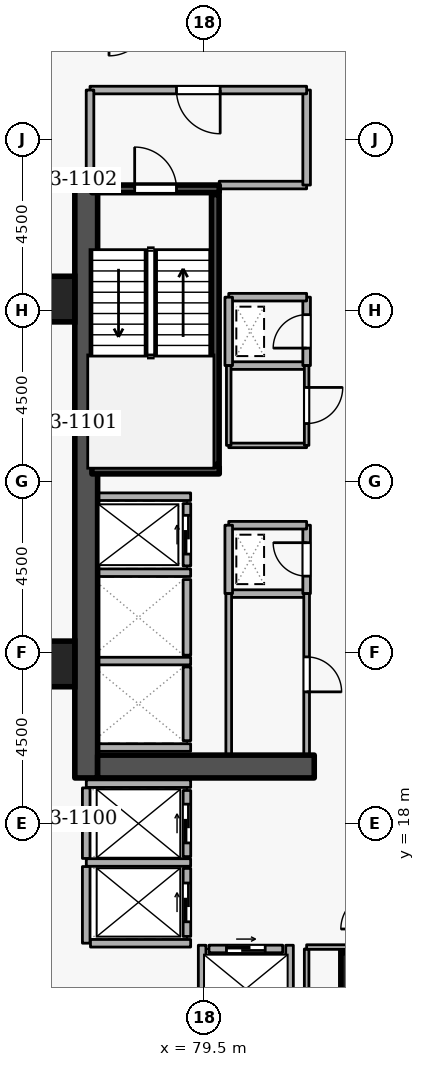
"""IFC4 building model, lengths in metres.
Left out: names, types, materials, properties, quantities, classifications, styles, units other than length and angle.
Written with IfcOpenShell. Run it as: python <this file> out.ifc"""

import sys

from ifc_helpers import new_model, si_unit, direction, frame, frame_2d, origin, origin_2d, place, context, subcontext, project, spatial, rectangle, extrude, element, fill, save


model = new_model("IFC4")
c1 = context("Model", 3, precision=1e-05, world=origin(), true_north=direction((0.0, 1.0)))
c2 = subcontext(c1, "Body", "Model", "MODEL_VIEW")
j1 = project(units=[si_unit("LENGTHUNIT", "METRE"), si_unit("PLANEANGLEUNIT", "RADIAN")], contexts=[c1])
p1 = place(None, origin())
s1 = spatial("IfcSite", under=j1, at=p1, CompositionType="ELEMENT")
p2 = place(p1, origin())
s2 = spatial("IfcBuilding", under=s1, at=p2, CompositionType="ELEMENT")
p3 = place(p2, frame((0.0, 0.0, 90.9)))
s3 = spatial("IfcBuildingStorey", under=s2, at=p3, CompositionType="ELEMENT", Elevation=90.9)
p4 = place(p3, frame((76.4, 19.2, 0.0), z_axis=(0.0, 0.0, 1.0), x_axis=(0.0, 1.0, 0.0)))
e1 = element("IfcWall", 1, at=p4, inside=s3, PredefinedType="SHEAR", context=c2, shape_type="SweptSolid", body=[
    extrude(rectangle(XDim=15.6, YDim=0.6, at=frame_2d((7.8, 0.0))), origin(), (0.0, 0.0, 1.0), 3.6),
])
p5 = place(p3, frame((76.7, 19.5, 0.0), z_axis=(0.0, 0.0, 1.0), x_axis=(1.0, 0.0, 0.0)))
e2 = element("IfcWall", 2, at=p5, inside=s3, PredefinedType="SHEAR", context=c2, shape_type="SweptSolid", body=[
    extrude(rectangle(XDim=5.7, YDim=0.6, at=frame_2d((2.85, 0.0))), origin(), (0.0, 0.0, 1.0), 3.6),
])
for number, where, z_axis, x_axis in (
    (3, (83.7, 14.0, 0.0), (0.0, 0.0, 1.0), (1.0, 0.0, 0.0)),
    (4, (75.5, 22.2, 0.0), (0.0, 0.0, 1.0), (1.0, 0.0, 0.0)),
    (5, (75.5, 31.8, 0.0), (0.0, 0.0, 1.0), (1.0, 0.0, 0.0)),
):
    element("IfcColumn", number, at=place(p3, frame(where, z_axis=z_axis, x_axis=x_axis)), inside=s3, PredefinedType="COLUMN", context=c2, shape_type="SweptSolid", body=[
        extrude(rectangle(XDim=1.2, YDim=1.2, at=origin_2d()), origin(), (0.0, 0.0, 1.0), 3.6),
    ])
p6 = place(p3, frame((79.05, 24.78, 0.0), z_axis=(0.0, 0.0, 1.0), x_axis=(0.0, 1.0, 0.0)))
e6 = element("IfcWall", 6, at=p6, inside=s3, PredefinedType="STANDARD", context=c2, shape_type="SweptSolid", body=[
    extrude(rectangle(XDim=1.64, YDim=0.2, at=frame_2d((0.82, 0.0))), origin(), (0.0, 0.0, 1.0), 3.34),
])
p7 = place(p6, frame((0.31, 0.0, 0.0)))
e7 = element("IfcOpeningElement", 7, at=p7, cuts=e6, PredefinedType="OPENING", context=c2, shape_type="SweptSolid", body=[
    extrude(rectangle(XDim=1.02, YDim=2.06, at=frame_2d((0.51, 1.03))), frame((0.0, 0.11, 0.0), z_axis=(0.0, -1.0, 0.0), x_axis=(1.0, 0.0, 0.0)), (0.0, 0.0, 1.0), 0.22),
])
p8 = place(p3, frame((79.05, 22.43, 0.0), z_axis=(0.0, 0.0, 1.0), x_axis=(0.0, 1.0, 0.0)))
e8 = element("IfcWall", 8, at=p8, inside=s3, PredefinedType="STANDARD", context=c2, shape_type="SweptSolid", body=[
    extrude(rectangle(XDim=1.99, YDim=0.2, at=frame_2d((0.995, 0.0))), origin(), (0.0, 0.0, 1.0), 3.34),
])
p9 = place(p3, frame((79.05, 20.18, 0.0), z_axis=(0.0, 0.0, 1.0), x_axis=(0.0, 1.0, 0.0)))
e9 = element("IfcWall", 9, at=p9, inside=s3, PredefinedType="STANDARD", context=c2, shape_type="SweptSolid", body=[
    extrude(rectangle(XDim=1.94, YDim=0.2, at=frame_2d((0.97, 0.0))), origin(), (0.0, 0.0, 1.0), 3.34),
])
p10 = place(p3, frame((79.05, 17.13, 0.0), z_axis=(0.0, 0.0, 1.0), x_axis=(0.0, 1.0, 0.0)))
e10 = element("IfcWall", 10, at=p10, inside=s3, PredefinedType="STANDARD", context=c2, shape_type="SweptSolid", body=[
    extrude(rectangle(XDim=1.74, YDim=0.2, at=frame_2d((0.87, 0.0))), origin(), (0.0, 0.0, 1.0), 3.34),
])
p11 = place(p10, frame((0.36, 0.0, 0.0)))
e11 = element("IfcOpeningElement", 11, at=p11, cuts=e10, PredefinedType="OPENING", context=c2, shape_type="SweptSolid", body=[
    extrude(rectangle(XDim=1.02, YDim=2.06, at=frame_2d((0.51, 1.03))), frame((0.0, 0.11, 0.0), z_axis=(0.0, -1.0, 0.0), x_axis=(1.0, 0.0, 0.0)), (0.0, 0.0, 1.0), 0.22),
])
p12 = place(p3, frame((79.05, 15.03, 0.0), z_axis=(0.0, 0.0, 1.0), x_axis=(0.0, 1.0, 0.0)))
e12 = element("IfcWall", 12, at=p12, inside=s3, PredefinedType="STANDARD", context=c2, shape_type="SweptSolid", body=[
    extrude(rectangle(XDim=1.79, YDim=0.2, at=frame_2d((0.895, 0.0))), origin(), (0.0, 0.0, 1.0), 3.34),
])
p13 = place(p12, frame((0.385, 0.0, 0.0)))
e13 = element("IfcOpeningElement", 13, at=p13, cuts=e12, PredefinedType="OPENING", context=c2, shape_type="SweptSolid", body=[
    extrude(rectangle(XDim=1.02, YDim=2.06, at=frame_2d((0.51, 1.03))), frame((0.0, 0.11, 0.0), z_axis=(0.0, -1.0, 0.0), x_axis=(1.0, 0.0, 0.0)), (0.0, 0.0, 1.0), 0.22),
])
p14 = place(p3, frame((79.63, 14.7, 0.0), z_axis=(0.0, 0.0, 1.0), x_axis=(1.0, 0.0, 0.0)))
e14 = element("IfcWall", 14, at=p14, inside=s3, PredefinedType="STANDARD", context=c2, shape_type="SweptSolid", body=[
    extrude(rectangle(XDim=1.94, YDim=0.2, at=frame_2d((0.97, 0.0))), origin(), (0.0, 0.0, 1.0), 3.34),
])
p15 = place(p14, frame((0.46, 0.0, 0.0)))
e15 = element("IfcOpeningElement", 15, at=p15, cuts=e14, PredefinedType="OPENING", context=c2, shape_type="SweptSolid", body=[
    extrude(rectangle(XDim=1.02, YDim=2.06, at=frame_2d((0.51, 1.03))), frame((0.0, 0.11, 0.0), z_axis=(0.0, -1.0, 0.0), x_axis=(1.0, 0.0, 0.0)), (0.0, 0.0, 1.0), 0.22),
])
for number, where, z_axis, x_axis in (
    (16, (76.712, 26.6, 0.0), (0.0, 0.0, 1.0), (1.0, 0.0, 0.0)),
    (17, (76.712, 24.6, 0.0), (0.0, 0.0, 1.0), (1.0, 0.0, 0.0)),
    (18, (76.712, 22.275, 0.0), (0.0, 0.0, 1.0), (1.0, 0.0, 0.0)),
    (19, (76.712, 20.0, 0.0), (0.0, 0.0, 1.0), (1.0, 0.0, 0.0)),
):
    element("IfcWall", number, at=place(p3, frame(where, z_axis=z_axis, x_axis=x_axis)), inside=s3, PredefinedType="STANDARD", context=c2, shape_type="SweptSolid", body=[
        extrude(rectangle(XDim=2.436, YDim=0.2, at=frame_2d((1.218, 0.0))), origin(), (0.0, 0.0, 1.0), 3.34),
    ])
p16 = place(p3, frame((76.402, 19.05, 0.0), z_axis=(0.0, 0.0, 1.0), x_axis=(1.0, 0.0, 0.0)))
e20 = element("IfcWall", 20, at=p16, inside=s3, PredefinedType="STANDARD", context=c2, shape_type="SweptSolid", body=[
    extrude(rectangle(XDim=2.746, YDim=0.2, at=frame_2d((1.373, 0.0))), origin(), (0.0, 0.0, 1.0), 2.545),
])
p17 = place(p3, frame((76.402, 16.975, 0.0), z_axis=(0.0, 0.0, 1.0), x_axis=(1.0, 0.0, 0.0)))
e21 = element("IfcWall", 21, at=p17, inside=s3, PredefinedType="STANDARD", context=c2, shape_type="SweptSolid", body=[
    extrude(rectangle(XDim=2.746, YDim=0.2, at=frame_2d((1.373, 0.0))), origin(), (0.0, 0.0, 1.0), 3.34),
])
p18 = place(p3, frame((76.4, 14.852, 0.0), z_axis=(0.0, 0.0, 1.0), x_axis=(0.0, 1.0, 0.0)))
e22 = element("IfcWall", 22, at=p18, inside=s3, PredefinedType="STANDARD", context=c2, shape_type="SweptSolid", body=[
    extrude(rectangle(XDim=2.016, YDim=0.2, at=frame_2d((1.008, 0.0))), origin(), (0.0, 0.0, 1.0), 3.34),
])
p19 = place(p3, frame((76.4, 17.082, 0.0), z_axis=(0.0, 0.0, 1.0), x_axis=(0.0, 1.0, 0.0)))
e23 = element("IfcWall", 23, at=p19, inside=s3, PredefinedType="STANDARD", context=c2, shape_type="SweptSolid", body=[
    extrude(rectangle(XDim=1.856, YDim=0.2, at=frame_2d((0.928, 0.0))), origin(), (0.0, 0.0, 1.0), 3.34),
])
p20 = place(p3, frame((76.512, 14.85, 0.0), z_axis=(0.0, 0.0, 1.0), x_axis=(1.0, 0.0, 0.0)))
e24 = element("IfcWall", 24, at=p20, inside=s3, PredefinedType="STANDARD", context=c2, shape_type="SweptSolid", body=[
    extrude(rectangle(XDim=2.636, YDim=0.2, at=frame_2d((1.318, 0.0))), origin(), (0.0, 0.0, 1.0), 3.34),
])
for number, where, z_axis, x_axis in (
    (25, (81.75, 12.612, 0.0), (0.0, 0.0, 1.0), (0.0, 1.0, 0.0)),
    (26, (79.45, 12.612, 0.0), (0.0, 0.0, 1.0), (0.0, 1.0, 0.0)),
):
    element("IfcWall", number, at=place(p3, frame(where, z_axis=z_axis, x_axis=x_axis)), inside=s3, PredefinedType="STANDARD", context=c2, shape_type="SweptSolid", body=[
        extrude(rectangle(XDim=2.186, YDim=0.2, at=frame_2d((1.093, 0.0))), origin(), (0.0, 0.0, 1.0), 3.34),
    ])
p21 = place(p3, frame((76.55, 34.7, 0.0), z_axis=(0.0, 0.0, 1.0), x_axis=(1.0, 0.0, 0.0)))
e27 = element("IfcWall", 27, at=p21, inside=s3, PredefinedType="SHEAR", context=c2, shape_type="SweptSolid", body=[
    extrude(rectangle(XDim=3.35, YDim=0.2, at=frame_2d((1.675, 0.0))), origin(), (0.0, 0.0, 1.0), 3.6),
])
p22 = place(p21, frame((1.125, 0.0, 0.0)))
e28 = element("IfcOpeningElement", 28, at=p22, cuts=e27, PredefinedType="OPENING", context=c2, shape_type="SweptSolid", body=[
    extrude(rectangle(XDim=1.1, YDim=2.1, at=frame_2d((0.55, 1.05))), frame((0.0, 0.11, 0.0), z_axis=(0.0, -1.0, 0.0), x_axis=(1.0, 0.0, 0.0)), (0.0, 0.0, 1.0), 0.22),
])
p23 = place(p3, frame((79.9, 27.3, 0.0), z_axis=(0.0, 0.0, 1.0), x_axis=(-1.0, 0.0, 0.0)))
e29 = element("IfcWall", 29, at=p23, inside=s3, PredefinedType="SHEAR", context=c2, shape_type="SweptSolid", body=[
    extrude(rectangle(XDim=3.35, YDim=0.2, at=frame_2d((1.675, 0.0))), origin(), (0.0, 0.0, 1.0), 3.6),
])
p24 = place(p3, frame((79.797, 27.45, 0.0), z_axis=(0.0, 0.0, 1.0), x_axis=(0.0, 1.0, 0.0)))
e30 = element("IfcWall", 30, at=p24, inside=s3, PredefinedType="SHEAR", context=c2, shape_type="SweptSolid", body=[
    extrude(rectangle(XDim=7.1, YDim=0.2, at=frame_2d((3.55, 0.0))), origin(), (0.0, 0.0, 1.0), 3.6),
])
p25 = place(p3, frame((79.9, 34.8, 0.0), z_axis=(0.0, 0.0, 1.0), x_axis=(1.0, 0.0, 0.0)))
e31 = element("IfcWall", 31, at=p25, inside=s3, PredefinedType="STANDARD", context=c2, shape_type="SweptSolid", body=[
    extrude(rectangle(XDim=2.3, YDim=0.2, at=frame_2d((1.15, 0.0))), origin(), (0.0, 0.0, 1.0), 2.545),
])
p26 = place(p3, frame((82.2, 34.8, 0.0), z_axis=(0.0, 0.0, 1.0), x_axis=(0.0, 1.0, 0.0)))
e32 = element("IfcWall", 32, at=p26, inside=s3, PredefinedType="STANDARD", context=c2, shape_type="SweptSolid", body=[
    extrude(rectangle(XDim=2.5, YDim=0.2, at=frame_2d((1.25, 0.0))), origin(), (0.0, 0.0, 1.0), 3.34),
])
p27 = place(p3, frame((82.2, 37.3, 0.0), z_axis=(0.0, 0.0, 1.0), x_axis=(-1.0, 0.0, 0.0)))
e33 = element("IfcWall", 33, at=p27, inside=s3, PredefinedType="STANDARD", context=c2, shape_type="SweptSolid", body=[
    extrude(rectangle(XDim=5.7, YDim=0.2, at=frame_2d((2.85, 0.0))), origin(), (0.0, 0.0, 1.0), 3.34),
])
p28 = place(p27, frame((2.275, 0.0, 0.0)))
e34 = element("IfcOpeningElement", 34, at=p28, cuts=e33, PredefinedType="OPENING", context=c2, shape_type="SweptSolid", body=[
    extrude(rectangle(XDim=1.15, YDim=2.1, at=frame_2d((0.575, 1.05))), frame((0.0, 0.11, 0.0), z_axis=(0.0, -1.0, 0.0), x_axis=(1.0, 0.0, 0.0)), (0.0, 0.0, 1.0), 0.22),
])
p29 = place(p3, frame((76.5, 37.3, 0.0), z_axis=(0.0, 0.0, 1.0), x_axis=(0.0, -1.0, 0.0)))
e35 = element("IfcWall", 35, at=p29, inside=s3, PredefinedType="STANDARD", context=c2, shape_type="SweptSolid", body=[
    extrude(rectangle(XDim=2.5, YDim=0.2, at=frame_2d((1.25, 0.0))), origin(), (0.0, 0.0, 1.0), 3.34),
])
p30 = place(p3, frame((80.15, 24.05, 0.0), z_axis=(0.0, 0.0, 1.0), x_axis=(1.0, 0.0, 0.0)))
e36 = element("IfcWall", 36, at=p30, inside=s3, PredefinedType="STANDARD", context=c2, shape_type="SweptSolid", body=[
    extrude(rectangle(XDim=2.05, YDim=0.2, at=frame_2d((1.025, 0.0))), origin(), (0.0, 0.0, 1.0), 3.34),
])
p31 = place(p3, frame((82.2, 24.05, 0.0), z_axis=(0.0, 0.0, 1.0), x_axis=(0.0, 1.0, 0.0)))
e37 = element("IfcWall", 37, at=p31, inside=s3, PredefinedType="STANDARD", context=c2, shape_type="SweptSolid", body=[
    extrude(rectangle(XDim=1.8, YDim=0.2, at=frame_2d((0.9, 0.0))), origin(), (0.0, 0.0, 1.0), 3.34),
])
p32 = place(p31, frame((0.46, 0.0, 0.0)))
e38 = element("IfcOpeningElement", 38, at=p32, cuts=e37, PredefinedType="OPENING", context=c2, shape_type="SweptSolid", body=[
    extrude(rectangle(XDim=0.88, YDim=2.04, at=frame_2d((0.44, 1.02))), frame((0.0, 0.11, 0.0), z_axis=(0.0, -1.0, 0.0), x_axis=(1.0, 0.0, 0.0)), (0.0, 0.0, 1.0), 0.22),
])
p33 = place(p3, frame((82.2, 25.85, 0.0), z_axis=(0.0, 0.0, 1.0), x_axis=(-1.0, 0.0, 0.0)))
e39 = element("IfcWall", 39, at=p33, inside=s3, PredefinedType="STANDARD", context=c2, shape_type="SweptSolid", body=[
    extrude(rectangle(XDim=2.05, YDim=0.2, at=frame_2d((1.025, 0.0))), origin(), (0.0, 0.0, 1.0), 3.34),
])
p34 = place(p3, frame((80.15, 25.85, 0.0), z_axis=(0.0, 0.0, 1.0), x_axis=(0.0, -1.0, 0.0)))
e40 = element("IfcWall", 40, at=p34, inside=s3, PredefinedType="STANDARD", context=c2, shape_type="SweptSolid", body=[
    extrude(rectangle(XDim=1.8, YDim=0.2, at=frame_2d((0.9, 0.0))), origin(), (0.0, 0.0, 1.0), 3.34),
])
p35 = place(p3, frame((80.15, 30.05, 0.0), z_axis=(0.0, 0.0, 1.0), x_axis=(1.0, 0.0, 0.0)))
e41 = element("IfcWall", 41, at=p35, inside=s3, PredefinedType="STANDARD", context=c2, shape_type="SweptSolid", body=[
    extrude(rectangle(XDim=2.05, YDim=0.2, at=frame_2d((1.025, 0.0))), origin(), (0.0, 0.0, 1.0), 3.34),
])
p36 = place(p3, frame((82.2, 30.05, 0.0), z_axis=(0.0, 0.0, 1.0), x_axis=(0.0, 1.0, 0.0)))
e42 = element("IfcWall", 42, at=p36, inside=s3, PredefinedType="STANDARD", context=c2, shape_type="SweptSolid", body=[
    extrude(rectangle(XDim=1.8, YDim=0.2, at=frame_2d((0.9, 0.0))), origin(), (0.0, 0.0, 1.0), 3.34),
])
p37 = place(p36, frame((0.46, 0.0, 0.0)))
e43 = element("IfcOpeningElement", 43, at=p37, cuts=e42, PredefinedType="OPENING", context=c2, shape_type="SweptSolid", body=[
    extrude(rectangle(XDim=0.88, YDim=2.04, at=frame_2d((0.44, 1.02))), frame((0.0, 0.11, 0.0), z_axis=(0.0, -1.0, 0.0), x_axis=(1.0, 0.0, 0.0)), (0.0, 0.0, 1.0), 0.22),
])
p38 = place(p3, frame((82.2, 31.85, 0.0), z_axis=(0.0, 0.0, 1.0), x_axis=(-1.0, 0.0, 0.0)))
e44 = element("IfcWall", 44, at=p38, inside=s3, PredefinedType="STANDARD", context=c2, shape_type="SweptSolid", body=[
    extrude(rectangle(XDim=2.05, YDim=0.2, at=frame_2d((1.025, 0.0))), origin(), (0.0, 0.0, 1.0), 3.34),
])
p39 = place(p3, frame((80.15, 31.85, 0.0), z_axis=(0.0, 0.0, 1.0), x_axis=(0.0, -1.0, 0.0)))
e45 = element("IfcWall", 45, at=p39, inside=s3, PredefinedType="STANDARD", context=c2, shape_type="SweptSolid", body=[
    extrude(rectangle(XDim=1.8, YDim=0.2, at=frame_2d((0.9, 0.0))), origin(), (0.0, 0.0, 1.0), 3.34),
])
p40 = place(p3, frame((80.15, 19.8, 0.0), z_axis=(0.0, 0.0, 1.0), x_axis=(0.0, 1.0, 0.0)))
e46 = element("IfcWall", 46, at=p40, inside=s3, PredefinedType="PARTITIONING", context=c2, shape_type="SweptSolid", body=[
    extrude(rectangle(XDim=4.25, YDim=0.15, at=frame_2d((2.125, 0.0))), origin(), (0.0, 0.0, 1.0), 3.34),
])
p41 = place(p3, frame((82.2, 24.05, 0.0), z_axis=(0.0, 0.0, 1.0), x_axis=(0.0, -1.0, 0.0)))
e47 = element("IfcWall", 47, at=p41, inside=s3, PredefinedType="PARTITIONING", context=c2, shape_type="SweptSolid", body=[
    extrude(rectangle(XDim=4.25, YDim=0.15, at=frame_2d((2.125, 0.0))), origin(), (0.0, 0.0, 1.0), 3.34),
])
p42 = place(p41, frame((1.665, 0.0, 0.0)))
e48 = element("IfcOpeningElement", 48, at=p42, cuts=e47, PredefinedType="OPENING", context=c2, shape_type="SweptSolid", body=[
    extrude(rectangle(XDim=0.92, YDim=2.08, at=frame_2d((0.46, 1.04))), frame((0.0, 0.085, 0.0), z_axis=(0.0, -1.0, 0.0), x_axis=(1.0, 0.0, 0.0)), (0.0, 0.0, 1.0), 0.17),
])
p43 = place(p3, frame((82.2, 27.95, 0.0), z_axis=(0.0, 0.0, 1.0), x_axis=(-1.0, 0.0, 0.0)))
e49 = element("IfcWall", 49, at=p43, inside=s3, PredefinedType="PARTITIONING", context=c2, shape_type="SweptSolid", body=[
    extrude(rectangle(XDim=2.05, YDim=0.12, at=frame_2d((1.025, 0.0))), origin(), (0.0, 0.0, 1.0), 3.34),
])
p44 = place(p3, frame((80.15, 27.95, 0.0), z_axis=(0.0, 0.0, 1.0), x_axis=(0.0, 1.0, 0.0)))
e50 = element("IfcWall", 50, at=p44, inside=s3, PredefinedType="PARTITIONING", context=c2, shape_type="SweptSolid", body=[
    extrude(rectangle(XDim=2.1, YDim=0.12, at=frame_2d((1.05, 0.0))), origin(), (0.0, 0.0, 1.0), 3.34),
])
p45 = place(p3, frame((82.2, 30.05, 0.0), z_axis=(0.0, 0.0, 1.0), x_axis=(0.0, -1.0, 0.0)))
e51 = element("IfcWall", 51, at=p45, inside=s3, PredefinedType="PARTITIONING", context=c2, shape_type="SweptSolid", body=[
    extrude(rectangle(XDim=2.1, YDim=0.12, at=frame_2d((1.05, 0.0))), origin(), (0.0, 0.0, 1.0), 3.34),
])
p46 = place(p45, frame((0.575, 0.0, 0.0)))
e52 = element("IfcOpeningElement", 52, at=p46, cuts=e51, PredefinedType="OPENING", context=c2, shape_type="SweptSolid", body=[
    extrude(rectangle(XDim=0.95, YDim=2.1, at=frame_2d((0.475, 1.05))), frame((0.0, 0.07, 0.0), z_axis=(0.0, -1.0, 0.0), x_axis=(1.0, 0.0, 0.0)), (0.0, 0.0, 1.0), 0.14),
])
p47 = place(p3, frame((82.2, 12.4, 0.0), z_axis=(0.0, 0.0, 1.0), x_axis=(0.0, 1.0, 0.0)))
e53 = element("IfcWall", 53, at=p47, inside=s3, PredefinedType="PARTITIONING", context=c2, shape_type="SweptSolid", body=[
    extrude(rectangle(XDim=2.3, YDim=0.12, at=frame_2d((1.15, 0.0))), origin(), (0.0, 0.0, 1.0), 3.34),
])
p48 = place(p3, frame((82.2, 14.75, 0.0), z_axis=(0.0, 0.0, 1.0), x_axis=(1.0, 0.0, 0.0)))
e54 = element("IfcWall", 54, at=p48, inside=s3, PredefinedType="PARTITIONING", context=c2, shape_type="SweptSolid", body=[
    extrude(rectangle(XDim=1.85, YDim=0.12, at=frame_2d((0.925, 0.0))), origin(), (0.0, 0.0, 1.0), 3.34),
])
p49 = place(p7, origin())
e55 = element("IfcDoor", 55, at=p49, inside=s3, OperationType="SLIDING_TO_LEFT", PredefinedType="DOOR", context=c2, shape_type="SweptSolid", body=[
    extrude(rectangle(XDim=1.02, YDim=2.06, at=frame_2d((0.51, 1.03))), frame((0.0, 0.025, 0.0), z_axis=(0.0, -1.0, 0.0), x_axis=(1.0, 0.0, 0.0)), (0.0, 0.0, 1.0), 0.05),
])
fill(e7, e55)
p50 = place(p11, origin())
e56 = element("IfcDoor", 56, at=p50, inside=s3, OperationType="SLIDING_TO_LEFT", PredefinedType="DOOR", context=c2, shape_type="SweptSolid", body=[
    extrude(rectangle(XDim=1.02, YDim=2.06, at=frame_2d((0.51, 1.03))), frame((0.0, 0.025, 0.0), z_axis=(0.0, -1.0, 0.0), x_axis=(1.0, 0.0, 0.0)), (0.0, 0.0, 1.0), 0.05),
])
fill(e11, e56)
p51 = place(p13, origin())
e57 = element("IfcDoor", 57, at=p51, inside=s3, OperationType="SLIDING_TO_LEFT", PredefinedType="DOOR", context=c2, shape_type="SweptSolid", body=[
    extrude(rectangle(XDim=1.02, YDim=2.06, at=frame_2d((0.51, 1.03))), frame((0.0, 0.025, 0.0), z_axis=(0.0, -1.0, 0.0), x_axis=(1.0, 0.0, 0.0)), (0.0, 0.0, 1.0), 0.05),
])
fill(e13, e57)
p52 = place(p15, origin())
e58 = element("IfcDoor", 58, at=p52, inside=s3, OperationType="SLIDING_TO_LEFT", PredefinedType="DOOR", context=c2, shape_type="SweptSolid", body=[
    extrude(rectangle(XDim=1.02, YDim=2.06, at=frame_2d((0.51, 1.03))), frame((0.0, 0.025, 0.0), z_axis=(0.0, -1.0, 0.0), x_axis=(1.0, 0.0, 0.0)), (0.0, 0.0, 1.0), 0.05),
])
fill(e15, e58)
p53 = place(p22, origin())
e59 = element("IfcDoor", 59, at=p53, inside=s3, OperationType="SINGLE_SWING_LEFT", PredefinedType="DOOR", context=c2, shape_type="SweptSolid", body=[
    extrude(rectangle(XDim=1.1, YDim=2.1, at=frame_2d((0.55, 1.05))), frame((0.0, 0.025, 0.0), z_axis=(0.0, -1.0, 0.0), x_axis=(1.0, 0.0, 0.0)), (0.0, 0.0, 1.0), 0.05),
])
fill(e28, e59)
p54 = place(p28, origin())
e60 = element("IfcDoor", 60, at=p54, inside=s3, OperationType="SINGLE_SWING_LEFT", PredefinedType="DOOR", context=c2, shape_type="SweptSolid", body=[
    extrude(rectangle(XDim=1.15, YDim=2.1, at=frame_2d((0.575, 1.05))), frame((0.0, 0.025, 0.0), z_axis=(0.0, -1.0, 0.0), x_axis=(1.0, 0.0, 0.0)), (0.0, 0.0, 1.0), 0.05),
])
fill(e34, e60)
p55 = place(p32, origin())
e61 = element("IfcDoor", 61, at=p55, inside=s3, OperationType="SINGLE_SWING_RIGHT", PredefinedType="DOOR", context=c2, shape_type="SweptSolid", body=[
    extrude(rectangle(XDim=0.88, YDim=2.04, at=frame_2d((0.44, 1.02))), frame((0.0, 0.025, 0.0), z_axis=(0.0, -1.0, 0.0), x_axis=(1.0, 0.0, 0.0)), (0.0, 0.0, 1.0), 0.05),
])
fill(e38, e61)
p56 = place(p37, origin())
e62 = element("IfcDoor", 62, at=p56, inside=s3, OperationType="SINGLE_SWING_LEFT", PredefinedType="DOOR", context=c2, shape_type="SweptSolid", body=[
    extrude(rectangle(XDim=0.88, YDim=2.04, at=frame_2d((0.44, 1.02))), frame((0.0, 0.025, 0.0), z_axis=(0.0, -1.0, 0.0), x_axis=(1.0, 0.0, 0.0)), (0.0, 0.0, 1.0), 0.05),
])
fill(e43, e62)
p57 = place(p42, origin())
e63 = element("IfcDoor", 63, at=p57, inside=s3, OperationType="SINGLE_SWING_RIGHT", PredefinedType="DOOR", context=c2, shape_type="SweptSolid", body=[
    extrude(rectangle(XDim=0.92, YDim=2.08, at=frame_2d((0.46, 1.04))), frame((0.0, 0.025, 0.0), z_axis=(0.0, -1.0, 0.0), x_axis=(1.0, 0.0, 0.0)), (0.0, 0.0, 1.0), 0.05),
])
fill(e48, e63)
p58 = place(p46, origin())
e64 = element("IfcDoor", 64, at=p58, inside=s3, OperationType="SINGLE_SWING_LEFT", PredefinedType="DOOR", context=c2, shape_type="SweptSolid", body=[
    extrude(rectangle(XDim=0.95, YDim=2.1, at=frame_2d((0.475, 1.05))), frame((0.0, 0.025, 0.0), z_axis=(0.0, -1.0, 0.0), x_axis=(1.0, 0.0, 0.0)), (0.0, 0.0, 1.0), 0.05),
])
fill(e52, e64)
save(model, sys.argv[1])
